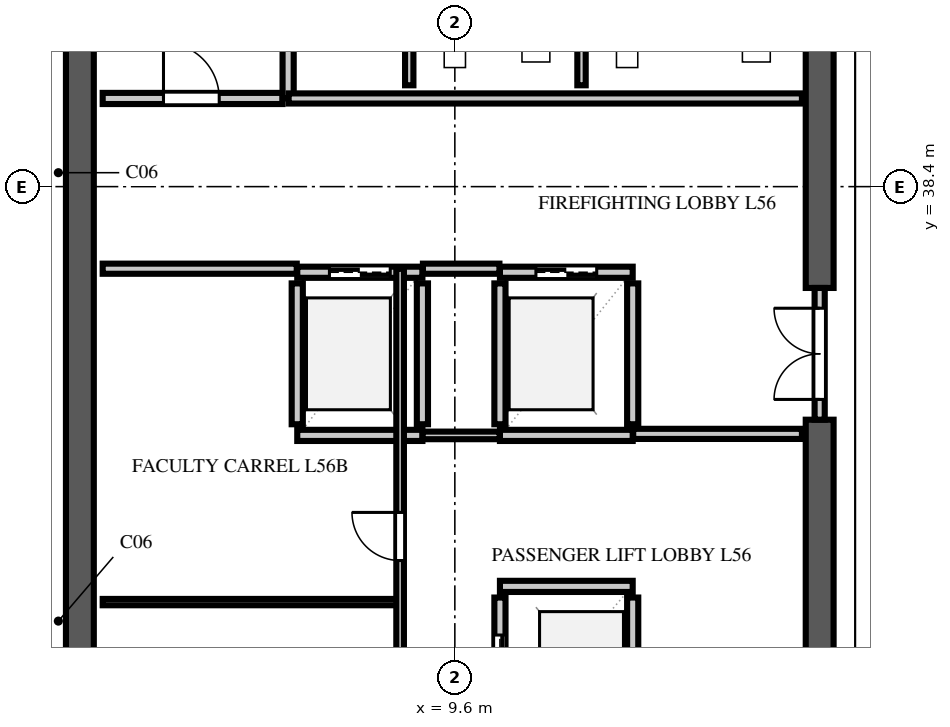
"""IFC4 building model, lengths in metres.
Left out: names, types, materials, properties, quantities, classifications, styles, units other than length and angle.
Written with IfcOpenShell. Run it as: python <this file> out.ifc"""

import sys

from ifc_helpers import new_model, si_unit, direction, frame, frame_2d, origin, place, context, subcontext, project, spatial, rectangle, extrude, element, fill, save


model = new_model("IFC4")
c1 = context("Model", 3, precision=1e-05, world=origin(), true_north=direction((0.0, 1.0)))
c2 = subcontext(c1, "Body", "Model", "MODEL_VIEW")
j1 = project(units=[si_unit("LENGTHUNIT", "METRE"), si_unit("PLANEANGLEUNIT", "RADIAN")], contexts=[c1])
p1 = place(None, origin())
s1 = spatial("IfcSite", under=j1, at=p1, CompositionType="ELEMENT")
p2 = place(p1, origin())
s2 = spatial("IfcBuilding", under=s1, at=p2, CompositionType="ELEMENT")
p3 = place(p2, frame((0.0, 0.0, 221.8)))
s3 = spatial("IfcBuildingStorey", under=s2, at=p3, CompositionType="ELEMENT", Elevation=221.8)
p4 = place(p3, frame((2.2, 9.325, 0.0), z_axis=(0.0, 0.0, 1.0), x_axis=(0.0, 1.0, 0.0)))
e1 = element("IfcWall", 1, at=p4, inside=s3, PredefinedType="SHEAR", context=c2, shape_type="SweptSolid", body=[
    extrude(rectangle(XDim=38.95, YDim=0.55, at=frame_2d((19.475, 0.0))), origin(), (0.0, 0.0, 1.0), 3.54),
])
p5 = place(p3, frame((16.8, 26.0, 0.0), z_axis=(0.0, 0.0, 1.0), x_axis=(0.0, 1.0, 0.0)))
e2 = element("IfcWall", 2, at=p5, inside=s3, PredefinedType="SHEAR", context=c2, shape_type="SweptSolid", body=[
    extrude(rectangle(XDim=7.8, YDim=0.55, at=frame_2d((3.9, 0.0))), origin(), (0.0, 0.0, 1.0), 3.54),
])
p6 = place(p3, frame((16.8, 36.4, 0.0), z_axis=(0.0, 0.0, 1.0), x_axis=(0.0, 1.0, 0.0)))
e3 = element("IfcWall", 3, at=p6, inside=s3, PredefinedType="SHEAR", context=c2, shape_type="SweptSolid", body=[
    extrude(rectangle(XDim=11.325, YDim=0.55, at=frame_2d((5.663, 0.0))), origin(), (0.0, 0.0, 1.0), 3.54),
])
p7 = place(p6, frame((9.2, 0.0, 0.0)))
e4 = element("IfcOpeningElement", 4, at=p7, cuts=e3, PredefinedType="OPENING", context=c2, shape_type="SweptSolid", body=[
    extrude(rectangle(XDim=0.95, YDim=2.15, at=frame_2d((0.475, 1.075))), frame((0.0, 0.287, 0.0), z_axis=(0.0, -1.0, 0.0), x_axis=(1.0, 0.0, 0.0)), (0.0, 0.0, 1.0), 0.574),
])
p8 = place(p3, frame((2.65, 40.14, 0.0), z_axis=(0.0, 0.0, 1.0), x_axis=(1.0, 0.0, 0.0)))
e5 = element("IfcWall", 5, at=p8, inside=s3, PredefinedType="SOLIDWALL", context=c2, shape_type="SweptSolid", body=[
    extrude(rectangle(XDim=3.55, YDim=0.22, at=frame_2d((1.775, 0.0))), origin(), (0.0, 0.0, 1.0), 3.54),
])
p9 = place(p8, frame((1.2, 0.0, 0.0)))
e6 = element("IfcOpeningElement", 6, at=p9, cuts=e5, PredefinedType="OPENING", context=c2, shape_type="SweptSolid", body=[
    extrude(rectangle(XDim=1.1, YDim=2.2, at=frame_2d((0.55, 1.1))), frame((0.0, 0.122, 0.0), z_axis=(0.0, -1.0, 0.0), x_axis=(1.0, 0.0, 0.0)), (0.0, 0.0, 1.0), 0.244),
])
p10 = place(p3, frame((6.31, 40.14, 0.0), z_axis=(0.0, 0.0, 1.0), x_axis=(0.0, 1.0, 0.0)))
e7 = element("IfcWall", 7, at=p10, inside=s3, PredefinedType="SOLIDWALL", context=c2, shape_type="SweptSolid", body=[
    extrude(rectangle(XDim=7.81, YDim=0.22, at=frame_2d((3.905, 0.0))), origin(), (0.0, 0.0, 1.0), 3.54),
])
p11 = place(p3, frame((10.49, 27.71, 0.0), z_axis=(0.0, 0.0, 1.0), x_axis=(0.0, 1.0, 0.0)))
e8 = element("IfcWall", 8, at=p11, inside=s3, PredefinedType="SOLIDWALL", context=c2, shape_type="SweptSolid", body=[
    extrude(rectangle(XDim=2.58, YDim=0.22, at=frame_2d((1.29, 0.0))), origin(), (0.0, 0.0, 1.0), 3.54),
])
p12 = place(p11, frame((0.74, 0.0, 0.0)))
e9 = element("IfcOpeningElement", 9, at=p12, cuts=e8, PredefinedType="OPENING", context=c2, shape_type="SweptSolid", body=[
    extrude(rectangle(XDim=1.1, YDim=2.2, at=frame_2d((0.55, 1.1))), frame((0.0, 0.122, 0.0), z_axis=(0.0, -1.0, 0.0), x_axis=(1.0, 0.0, 0.0)), (0.0, 0.0, 1.0), 0.244),
])
p13 = place(p3, frame((13.11, 27.71, 0.0), z_axis=(0.0, 0.0, 1.0), x_axis=(0.0, 1.0, 0.0)))
e10 = element("IfcWall", 10, at=p13, inside=s3, PredefinedType="SOLIDWALL", context=c2, shape_type="SweptSolid", body=[
    extrude(rectangle(XDim=2.58, YDim=0.22, at=frame_2d((1.29, 0.0))), origin(), (0.0, 0.0, 1.0), 3.54),
])
p14 = place(p3, frame((10.49, 30.51, 0.0), z_axis=(0.0, 0.0, 1.0), x_axis=(1.0, 0.0, 0.0)))
e11 = element("IfcWall", 11, at=p14, inside=s3, PredefinedType="SOLIDWALL", context=c2, shape_type="SweptSolid", body=[
    extrude(rectangle(XDim=2.62, YDim=0.22, at=frame_2d((1.31, 0.0))), origin(), (0.0, 0.0, 1.0), 3.54),
])
for number, where, z_axis, x_axis in (
    (12, (6.49, 33.71, 0.0), (0.0, 0.0, 1.0), (0.0, 1.0, 0.0)),
    (13, (8.96, 33.71, 0.0), (0.0, 0.0, 1.0), (0.0, 1.0, 0.0)),
):
    element("IfcWall", number, at=place(p3, frame(where, z_axis=z_axis, x_axis=x_axis)), inside=s3, PredefinedType="SOLIDWALL", context=c2, shape_type="SweptSolid", body=[
        extrude(rectangle(XDim=2.78, YDim=0.22, at=frame_2d((1.39, 0.0))), origin(), (0.0, 0.0, 1.0), 3.54),
    ])
p15 = place(p3, frame((6.49, 33.49, 0.0), z_axis=(0.0, 0.0, 1.0), x_axis=(1.0, 0.0, 0.0)))
e14 = element("IfcWall", 14, at=p15, inside=s3, PredefinedType="SOLIDWALL", context=c2, shape_type="SweptSolid", body=[
    extrude(rectangle(XDim=2.47, YDim=0.22, at=frame_2d((1.235, 0.0))), origin(), (0.0, 0.0, 1.0), 3.54),
])
p16 = place(p3, frame((6.49, 36.71, 0.0), z_axis=(0.0, 0.0, 1.0), x_axis=(1.0, 0.0, 0.0)))
e15 = element("IfcWall", 15, at=p16, inside=s3, PredefinedType="SOLIDWALL", context=c2, shape_type="SweptSolid", body=[
    extrude(rectangle(XDim=2.47, YDim=0.22, at=frame_2d((1.235, 0.0))), origin(), (0.0, 0.0, 1.0), 3.54),
])
p17 = place(p16, frame((0.635, 0.0, 0.0)))
e16 = element("IfcOpeningElement", 16, at=p17, cuts=e15, PredefinedType="OPENING", context=c2, shape_type="SweptSolid", body=[
    extrude(rectangle(XDim=1.2, YDim=2.2, at=frame_2d((0.6, 1.1))), frame((0.0, 0.122, 0.0), z_axis=(0.0, -1.0, 0.0), x_axis=(1.0, 0.0, 0.0)), (0.0, 0.0, 1.0), 0.244),
])
for number, where, z_axis, x_axis in (
    (17, (10.49, 33.71, 0.0), (0.0, 0.0, 1.0), (0.0, 1.0, 0.0)),
    (18, (13.11, 33.71, 0.0), (0.0, 0.0, 1.0), (0.0, 1.0, 0.0)),
):
    element("IfcWall", number, at=place(p3, frame(where, z_axis=z_axis, x_axis=x_axis)), inside=s3, PredefinedType="SOLIDWALL", context=c2, shape_type="SweptSolid", body=[
        extrude(rectangle(XDim=2.78, YDim=0.22, at=frame_2d((1.39, 0.0))), origin(), (0.0, 0.0, 1.0), 3.54),
    ])
p18 = place(p3, frame((10.49, 33.49, 0.0), z_axis=(0.0, 0.0, 1.0), x_axis=(1.0, 0.0, 0.0)))
e19 = element("IfcWall", 19, at=p18, inside=s3, PredefinedType="SOLIDWALL", context=c2, shape_type="SweptSolid", body=[
    extrude(rectangle(XDim=2.62, YDim=0.22, at=frame_2d((1.31, 0.0))), origin(), (0.0, 0.0, 1.0), 3.54),
])
p19 = place(p3, frame((10.49, 36.71, 0.0), z_axis=(0.0, 0.0, 1.0), x_axis=(1.0, 0.0, 0.0)))
e20 = element("IfcWall", 20, at=p19, inside=s3, PredefinedType="SOLIDWALL", context=c2, shape_type="SweptSolid", body=[
    extrude(rectangle(XDim=2.62, YDim=0.22, at=frame_2d((1.31, 0.0))), origin(), (0.0, 0.0, 1.0), 3.54),
])
p20 = place(p19, frame((0.71, 0.0, 0.0)))
e21 = element("IfcOpeningElement", 21, at=p20, cuts=e20, PredefinedType="OPENING", context=c2, shape_type="SweptSolid", body=[
    extrude(rectangle(XDim=1.2, YDim=2.2, at=frame_2d((0.6, 1.1))), frame((0.0, 0.122, 0.0), z_axis=(0.0, -1.0, 0.0), x_axis=(1.0, 0.0, 0.0)), (0.0, 0.0, 1.0), 0.244),
])
p21 = place(p3, frame((2.65, 36.78, 0.0), z_axis=(0.0, 0.0, 1.0), x_axis=(1.0, 0.0, 0.0)))
e22 = element("IfcWall", 22, at=p21, inside=s3, PredefinedType="SOLIDWALL", context=c2, shape_type="SweptSolid", body=[
    extrude(rectangle(XDim=3.83, YDim=0.2, at=frame_2d((1.915, 0.0))), origin(), (0.0, 0.0, 1.0), 3.54),
])
p22 = place(p3, frame((8.97, 36.78, 0.0), z_axis=(0.0, 0.0, 1.0), x_axis=(1.0, 0.0, 0.0)))
e23 = element("IfcWall", 23, at=p22, inside=s3, PredefinedType="SOLIDWALL", context=c2, shape_type="SweptSolid", body=[
    extrude(rectangle(XDim=1.51, YDim=0.2, at=frame_2d((0.755, 0.0))), origin(), (0.0, 0.0, 1.0), 3.54),
])
p23 = place(p3, frame((13.12, 33.52, 0.0), z_axis=(0.0, 0.0, 1.0), x_axis=(1.0, 0.0, 0.0)))
e24 = element("IfcWall", 24, at=p23, inside=s3, PredefinedType="SOLIDWALL", context=c2, shape_type="SweptSolid", body=[
    extrude(rectangle(XDim=3.33, YDim=0.2, at=frame_2d((1.665, 0.0))), origin(), (0.0, 0.0, 1.0), 3.54),
])
p24 = place(p3, frame((6.32, 40.14, 0.0), z_axis=(0.0, 0.0, 1.0), x_axis=(1.0, 0.0, 0.0)))
e25 = element("IfcWall", 25, at=p24, inside=s3, PredefinedType="SOLIDWALL", context=c2, shape_type="SweptSolid", body=[
    extrude(rectangle(XDim=10.13, YDim=0.2, at=frame_2d((5.065, 0.0))), origin(), (0.0, 0.0, 1.0), 3.54),
])
p25 = place(p3, frame((16.8, 33.8, 0.0), z_axis=(0.0, 0.0, 1.0), x_axis=(0.0, 1.0, 0.0)))
e26 = element("IfcWall", 26, at=p25, inside=s3, PredefinedType="SOLIDWALL", context=c2, shape_type="SweptSolid", body=[
    extrude(rectangle(XDim=2.6, YDim=0.2, at=frame_2d((1.3, 0.0))), origin(), (0.0, 0.0, 1.0), 3.54),
])
p26 = place(p25, frame((0.4, 0.0, 0.0)))
e27 = element("IfcOpeningElement", 27, at=p26, cuts=e26, PredefinedType="OPENING", context=c2, shape_type="SweptSolid", body=[
    extrude(rectangle(XDim=1.8, YDim=2.2, at=frame_2d((0.9, 1.1))), frame((0.0, 0.112, 0.0), z_axis=(0.0, -1.0, 0.0), x_axis=(1.0, 0.0, 0.0)), (0.0, 0.0, 1.0), 0.224),
])
p27 = place(p3, frame((8.965, 33.49, 0.0), z_axis=(0.0, 0.0, 1.0), x_axis=(1.0, 0.0, 0.0)))
e28 = element("IfcWall", 28, at=p27, inside=s3, PredefinedType="PARTITIONING", context=c2, shape_type="SweptSolid", body=[
    extrude(rectangle(XDim=1.52, YDim=0.15, at=frame_2d((0.76, 0.0))), origin(), (0.0, 0.0, 1.0), 3.54),
])
p28 = place(p3, frame((2.65, 30.2, 0.0), z_axis=(0.0, 0.0, 1.0), x_axis=(1.0, 0.0, 0.0)))
e29 = element("IfcWall", 29, at=p28, inside=s3, PredefinedType="PARTITIONING", context=c2, shape_type="SweptSolid", body=[
    extrude(rectangle(XDim=5.87, YDim=0.125, at=frame_2d((2.935, 0.0))), origin(), (0.0, 0.0, 1.0), 3.54),
])
p29 = place(p3, frame((8.52, 12.02, 0.0), z_axis=(0.0, 0.0, 1.0), x_axis=(0.0, 1.0, 0.0)))
e30 = element("IfcWall", 30, at=p29, inside=s3, PredefinedType="PARTITIONING", context=c2, shape_type="SweptSolid", body=[
    extrude(rectangle(XDim=24.76, YDim=0.15, at=frame_2d((12.38, 0.0))), origin(), (0.0, 0.0, 1.0), 3.54),
])
p30 = place(p29, frame((8.0, 0.0, 0.0)))
e31 = element("IfcOpeningElement", 31, at=p30, cuts=e30, PredefinedType="OPENING", context=c2, shape_type="SweptSolid", body=[
    extrude(rectangle(XDim=0.95, YDim=2.15, at=frame_2d((0.475, 1.075))), frame((0.0, 0.087, 0.0), z_axis=(0.0, -1.0, 0.0), x_axis=(1.0, 0.0, 0.0)), (0.0, 0.0, 1.0), 0.174),
])
p31 = place(p29, frame((19.0, 0.0, 0.0)))
e32 = element("IfcOpeningElement", 32, at=p31, cuts=e30, PredefinedType="OPENING", context=c2, shape_type="SweptSolid", body=[
    extrude(rectangle(XDim=0.95, YDim=2.15, at=frame_2d((0.475, 1.075))), frame((0.0, 0.087, 0.0), z_axis=(0.0, -1.0, 0.0), x_axis=(1.0, 0.0, 0.0)), (0.0, 0.0, 1.0), 0.174),
])
for number, where, z_axis, x_axis in (
    (33, (8.7, 40.4, 0.0), (0.0, 0.0, 1.0), (0.0, 1.0, 0.0)),
    (34, (12.1, 40.4, 0.0), (0.0, 0.0, 1.0), (0.0, 1.0, 0.0)),
):
    element("IfcWall", number, at=place(p3, frame(where, z_axis=z_axis, x_axis=x_axis)), inside=s3, PredefinedType="PLUMBINGWALL", context=c2, shape_type="SweptSolid", body=[
        extrude(rectangle(XDim=4.92, YDim=0.165, at=frame_2d((2.46, 0.0))), origin(), (0.0, 0.0, 1.0), 3.54),
    ])
p32 = place(p9, origin())
e35 = element("IfcDoor", 35, at=p32, inside=s3, OperationType="SINGLE_SWING_LEFT", PredefinedType="DOOR", context=c2, shape_type="SweptSolid", body=[
    extrude(rectangle(XDim=1.1, YDim=2.2, at=frame_2d((0.55, 1.1))), frame((0.0, 0.025, 0.0), z_axis=(0.0, -1.0, 0.0), x_axis=(1.0, 0.0, 0.0)), (0.0, 0.0, 1.0), 0.05),
])
fill(e6, e35)
p33 = place(p12, origin())
e36 = element("IfcDoor", 36, at=p33, inside=s3, OperationType="DOUBLE_DOOR_SLIDING", PredefinedType="DOOR", context=c2, shape_type="SweptSolid", body=[
    extrude(rectangle(XDim=1.1, YDim=2.2, at=frame_2d((0.55, 1.1))), frame((0.0, 0.025, 0.0), z_axis=(0.0, -1.0, 0.0), x_axis=(1.0, 0.0, 0.0)), (0.0, 0.0, 1.0), 0.05),
])
fill(e9, e36)
p34 = place(p17, origin())
e37 = element("IfcDoor", 37, at=p34, inside=s3, OperationType="DOUBLE_DOOR_SLIDING", PredefinedType="DOOR", context=c2, shape_type="SweptSolid", body=[
    extrude(rectangle(XDim=1.2, YDim=2.2, at=frame_2d((0.6, 1.1))), frame((0.0, 0.025, 0.0), z_axis=(0.0, -1.0, 0.0), x_axis=(1.0, 0.0, 0.0)), (0.0, 0.0, 1.0), 0.05),
])
fill(e16, e37)
p35 = place(p20, origin())
e38 = element("IfcDoor", 38, at=p35, inside=s3, OperationType="DOUBLE_DOOR_SLIDING", PredefinedType="DOOR", context=c2, shape_type="SweptSolid", body=[
    extrude(rectangle(XDim=1.2, YDim=2.2, at=frame_2d((0.6, 1.1))), frame((0.0, 0.025, 0.0), z_axis=(0.0, -1.0, 0.0), x_axis=(1.0, 0.0, 0.0)), (0.0, 0.0, 1.0), 0.05),
])
fill(e21, e38)
p36 = place(p26, origin())
e39 = element("IfcDoor", 39, at=p36, inside=s3, OperationType="DOUBLE_DOOR_SINGLE_SWING", PredefinedType="DOOR", context=c2, shape_type="SweptSolid", body=[
    extrude(rectangle(XDim=1.8, YDim=2.2, at=frame_2d((0.9, 1.1))), frame((0.0, 0.025, 0.0), z_axis=(0.0, -1.0, 0.0), x_axis=(1.0, 0.0, 0.0)), (0.0, 0.0, 1.0), 0.05),
])
fill(e27, e39)
p37 = place(p31, origin())
e40 = element("IfcDoor", 40, at=p37, inside=s3, OperationType="SINGLE_SWING_RIGHT", PredefinedType="DOOR", context=c2, shape_type="SweptSolid", body=[
    extrude(rectangle(XDim=0.95, YDim=2.15, at=frame_2d((0.475, 1.075))), frame((0.0, 0.025, 0.0), z_axis=(0.0, -1.0, 0.0), x_axis=(1.0, 0.0, 0.0)), (0.0, 0.0, 1.0), 0.05),
])
fill(e32, e40)
save(model, sys.argv[1])
